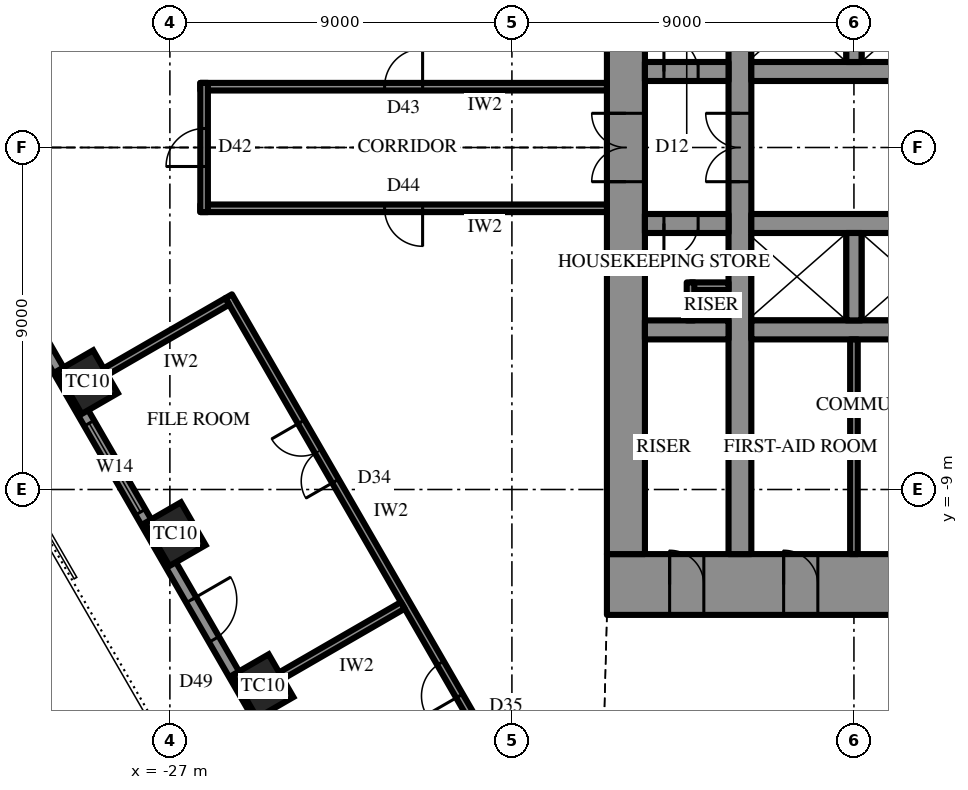
"""IFC4 building model, lengths in metres.
Left out: names, types, materials, properties, quantities, classifications, styles, units other than length and angle.
Written with IfcOpenShell. Run it as: python <this file> out.ifc"""

import sys

from ifc_helpers import new_model, si_unit, direction, frame, frame_2d, origin, origin_2d, place, context, subcontext, project, spatial, rectangle, extrude, element, fill, save


model = new_model("IFC4")
c1 = context("Model", 3, precision=1e-05, world=origin(), true_north=direction((0.0, 1.0)))
c2 = subcontext(c1, "Body", "Model", "MODEL_VIEW")
j1 = project(units=[si_unit("LENGTHUNIT", "METRE"), si_unit("PLANEANGLEUNIT", "RADIAN")], contexts=[c1])
p1 = place(None, origin())
s1 = spatial("IfcSite", under=j1, at=p1, CompositionType="ELEMENT")
p2 = place(p1, origin())
s2 = spatial("IfcBuilding", under=s1, at=p2, CompositionType="ELEMENT")
p3 = place(p2, frame((0.0, 0.0, 249.1)))
s3 = spatial("IfcBuildingStorey", under=s2, at=p3, CompositionType="ELEMENT", Elevation=249.1)
for number, where, z_axis, x_axis in (
    (1, (-29.171, -6.175, 0.0), (0.0, 0.0, 1.0), (0.5, -0.866, 0.0)),
    (2, (-26.861, -10.175, 0.0), (0.0, 0.0, 1.0), (0.5, -0.866, 0.0)),
    (3, (-24.552, -14.175, 0.0), (0.0, 0.0, 1.0), (0.5, -0.866, 0.0)),
):
    element("IfcColumn", number, at=place(p3, frame(where, z_axis=z_axis, x_axis=x_axis)), inside=s3, PredefinedType="COLUMN", context=c2, shape_type="SweptSolid", body=[
        extrude(rectangle(XDim=1.3, YDim=1.1, at=origin_2d()), origin(), (0.0, 0.0, 1.0), 4.2),
    ])
p4 = place(p3, frame((15.5, -11.5, 0.0), z_axis=(0.0, 0.0, 1.0), x_axis=(-1.0, 0.0, 0.0)))
e4 = element("IfcWall", 4, at=p4, inside=s3, PredefinedType="SHEAR", context=c2, shape_type="SweptSolid", body=[
    extrude(rectangle(XDim=31.0, YDim=1.6, at=frame_2d((15.5, 0.0))), origin(), (0.0, 0.0, 1.0), 4.2),
])
p5 = place(p4, frame((16.35, 0.0, 0.0)))
e5 = element("IfcOpeningElement", 5, at=p5, cuts=e4, PredefinedType="OPENING", context=c2, shape_type="SweptSolid", body=[
    extrude(rectangle(XDim=0.9, YDim=2.2, at=frame_2d((0.45, 1.1))), frame((0.0, 0.81, 0.0), z_axis=(0.0, -1.0, 0.0), x_axis=(1.0, 0.0, 0.0)), (0.0, 0.0, 1.0), 1.62),
])
p6 = place(p4, frame((19.35, 0.0, 0.0)))
e6 = element("IfcOpeningElement", 6, at=p6, cuts=e4, PredefinedType="OPENING", context=c2, shape_type="SweptSolid", body=[
    extrude(rectangle(XDim=0.9, YDim=2.2, at=frame_2d((0.45, 1.1))), frame((0.0, 0.81, 0.0), z_axis=(0.0, -1.0, 0.0), x_axis=(1.0, 0.0, 0.0)), (0.0, 0.0, 1.0), 1.62),
])
p7 = place(p4, frame((22.4, 0.0, 0.0)))
e7 = element("IfcOpeningElement", 7, at=p7, cuts=e4, PredefinedType="OPENING", context=c2, shape_type="SweptSolid", body=[
    extrude(rectangle(XDim=1.0, YDim=2.2, at=frame_2d((0.5, 1.1))), frame((0.0, 0.81, 0.0), z_axis=(0.0, -1.0, 0.0), x_axis=(1.0, 0.0, 0.0)), (0.0, 0.0, 1.0), 1.62),
])
p8 = place(p4, frame((1.65, 0.0, 0.0)))
e8 = element("IfcOpeningElement", 8, at=p8, cuts=e4, PredefinedType="OPENING", context=c2, shape_type="SweptSolid", body=[
    extrude(rectangle(XDim=0.9, YDim=2.2, at=frame_2d((0.45, 1.1))), frame((0.0, 0.81, 0.0), z_axis=(0.0, -1.0, 0.0), x_axis=(1.0, 0.0, 0.0)), (0.0, 0.0, 1.0), 1.62),
])
p9 = place(p4, frame((4.65, 0.0, 0.0)))
e9 = element("IfcOpeningElement", 9, at=p9, cuts=e4, PredefinedType="OPENING", context=c2, shape_type="SweptSolid", body=[
    extrude(rectangle(XDim=0.9, YDim=2.2, at=frame_2d((0.45, 1.1))), frame((0.0, 0.81, 0.0), z_axis=(0.0, -1.0, 0.0), x_axis=(1.0, 0.0, 0.0)), (0.0, 0.0, 1.0), 1.62),
])
p10 = place(p4, frame((25.45, 0.0, 0.0)))
e10 = element("IfcOpeningElement", 10, at=p10, cuts=e4, PredefinedType="OPENING", context=c2, shape_type="SweptSolid", body=[
    extrude(rectangle(XDim=0.9, YDim=2.2, at=frame_2d((0.45, 1.1))), frame((0.0, 0.81, 0.0), z_axis=(0.0, -1.0, 0.0), x_axis=(1.0, 0.0, 0.0)), (0.0, 0.0, 1.0), 1.62),
])
p11 = place(p4, frame((28.45, 0.0, 0.0)))
e11 = element("IfcOpeningElement", 11, at=p11, cuts=e4, PredefinedType="OPENING", context=c2, shape_type="SweptSolid", body=[
    extrude(rectangle(XDim=0.9, YDim=2.2, at=frame_2d((0.45, 1.1))), frame((0.0, 0.81, 0.0), z_axis=(0.0, -1.0, 0.0), x_axis=(1.0, 0.0, 0.0)), (0.0, 0.0, 1.0), 1.62),
])
p12 = place(p3, frame((-15.0, 10.7, 0.0), z_axis=(0.0, 0.0, 1.0), x_axis=(0.0, -1.0, 0.0)))
e12 = element("IfcWall", 12, at=p12, inside=s3, PredefinedType="SHEAR", context=c2, shape_type="SweptSolid", body=[
    extrude(rectangle(XDim=21.4, YDim=1.0, at=frame_2d((10.7, 0.0))), origin(), (0.0, 0.0, 1.0), 4.2),
])
p13 = place(p12, frame((9.8, 0.0, 0.0)))
e13 = element("IfcOpeningElement", 13, at=p13, cuts=e12, PredefinedType="OPENING", context=c2, shape_type="SweptSolid", body=[
    extrude(rectangle(XDim=1.8, YDim=2.4, at=frame_2d((0.9, 1.2))), frame((0.0, 0.51, 0.0), z_axis=(0.0, -1.0, 0.0), x_axis=(1.0, 0.0, 0.0)), (0.0, 0.0, 1.0), 1.02),
])
p14 = place(p3, frame((-12.0, -10.7, 0.0), z_axis=(0.0, 0.0, 1.0), x_axis=(0.0, 1.0, 0.0)))
e14 = element("IfcWall", 14, at=p14, inside=s3, PredefinedType="SHEAR", context=c2, shape_type="SweptSolid", body=[
    extrude(rectangle(XDim=21.4, YDim=0.6, at=frame_2d((10.7, 0.0))), origin(), (0.0, 0.0, 1.0), 4.2),
])
p15 = place(p14, frame((9.8, 0.0, 0.0)))
e15 = element("IfcOpeningElement", 15, at=p15, cuts=e14, PredefinedType="OPENING", context=c2, shape_type="SweptSolid", body=[
    extrude(rectangle(XDim=1.8, YDim=2.4, at=frame_2d((0.9, 1.2))), frame((0.0, 0.31, 0.0), z_axis=(0.0, -1.0, 0.0), x_axis=(1.0, 0.0, 0.0)), (0.0, 0.0, 1.0), 0.62),
])
p16 = place(p3, frame((-14.5, 2.0, 0.0), z_axis=(0.0, 0.0, 1.0), x_axis=(1.0, 0.0, 0.0)))
e16 = element("IfcWall", 16, at=p16, inside=s3, PredefinedType="SHEAR", context=c2, shape_type="SweptSolid", body=[
    extrude(rectangle(XDim=2.2, YDim=0.5, at=frame_2d((1.1, 0.0))), origin(), (0.0, 0.0, 1.0), 4.2),
])
p17 = place(p16, frame((0.5, 0.0, 0.0)))
e17 = element("IfcOpeningElement", 17, at=p17, cuts=e16, PredefinedType="OPENING", context=c2, shape_type="SweptSolid", body=[
    extrude(rectangle(XDim=0.9, YDim=2.2, at=frame_2d((0.45, 1.1))), frame((0.0, 0.26, 0.0), z_axis=(0.0, -1.0, 0.0), x_axis=(1.0, 0.0, 0.0)), (0.0, 0.0, 1.0), 0.52),
])
p18 = place(p3, frame((-11.7, 2.0, 0.0), z_axis=(0.0, 0.0, 1.0), x_axis=(1.0, 0.0, 0.0)))
e18 = element("IfcWall", 18, at=p18, inside=s3, PredefinedType="SHEAR", context=c2, shape_type="SweptSolid", body=[
    extrude(rectangle(XDim=5.9, YDim=0.5, at=frame_2d((2.95, 0.0))), origin(), (0.0, 0.0, 1.0), 4.2),
])
p19 = place(p3, frame((-9.0, 2.25, 0.0), z_axis=(0.0, 0.0, 1.0), x_axis=(0.0, 1.0, 0.0)))
e19 = element("IfcWall", 19, at=p19, inside=s3, PredefinedType="SHEAR", context=c2, shape_type="SweptSolid", body=[
    extrude(rectangle(XDim=2.3, YDim=0.4, at=frame_2d((1.15, 0.0))), origin(), (0.0, 0.0, 1.0), 4.2),
])
p20 = place(p3, frame((3.2, -2.0, 0.0), z_axis=(0.0, 0.0, 1.0), x_axis=(-1.0, 0.0, 0.0)))
e20 = element("IfcWall", 20, at=p20, inside=s3, PredefinedType="SHEAR", context=c2, shape_type="SweptSolid", body=[
    extrude(rectangle(XDim=14.9, YDim=0.5, at=frame_2d((7.45, 0.0))), origin(), (0.0, 0.0, 1.0), 4.2),
])
p21 = place(p20, frame((1.15, 0.0, 0.0)))
e21 = element("IfcOpeningElement", 21, at=p21, cuts=e20, PredefinedType="OPENING", context=c2, shape_type="SweptSolid", body=[
    extrude(rectangle(XDim=1.1, YDim=2.2, at=frame_2d((0.55, 1.1))), frame((0.0, 0.26, 0.0), z_axis=(0.0, -1.0, 0.0), x_axis=(1.0, 0.0, 0.0)), (0.0, 0.0, 1.0), 0.52),
])
p22 = place(p20, frame((4.15, 0.0, 0.0)))
e22 = element("IfcOpeningElement", 22, at=p22, cuts=e20, PredefinedType="OPENING", context=c2, shape_type="SweptSolid", body=[
    extrude(rectangle(XDim=1.1, YDim=2.2, at=frame_2d((0.55, 1.1))), frame((0.0, 0.26, 0.0), z_axis=(0.0, -1.0, 0.0), x_axis=(1.0, 0.0, 0.0)), (0.0, 0.0, 1.0), 0.52),
])
p23 = place(p20, frame((7.15, 0.0, 0.0)))
e23 = element("IfcOpeningElement", 23, at=p23, cuts=e20, PredefinedType="OPENING", context=c2, shape_type="SweptSolid", body=[
    extrude(rectangle(XDim=1.1, YDim=2.2, at=frame_2d((0.55, 1.1))), frame((0.0, 0.26, 0.0), z_axis=(0.0, -1.0, 0.0), x_axis=(1.0, 0.0, 0.0)), (0.0, 0.0, 1.0), 0.52),
])
p24 = place(p20, frame((10.15, 0.0, 0.0)))
e24 = element("IfcOpeningElement", 24, at=p24, cuts=e20, PredefinedType="OPENING", context=c2, shape_type="SweptSolid", body=[
    extrude(rectangle(XDim=1.1, YDim=2.2, at=frame_2d((0.55, 1.1))), frame((0.0, 0.26, 0.0), z_axis=(0.0, -1.0, 0.0), x_axis=(1.0, 0.0, 0.0)), (0.0, 0.0, 1.0), 0.52),
])
p25 = place(p3, frame((-12.3, -2.0, 0.0), z_axis=(0.0, 0.0, 1.0), x_axis=(-1.0, 0.0, 0.0)))
e25 = element("IfcWall", 25, at=p25, inside=s3, PredefinedType="SHEAR", context=c2, shape_type="SweptSolid", body=[
    extrude(rectangle(XDim=2.2, YDim=0.5, at=frame_2d((1.1, 0.0))), origin(), (0.0, 0.0, 1.0), 4.2),
])
p26 = place(p25, frame((0.8, 0.0, 0.0)))
e26 = element("IfcOpeningElement", 26, at=p26, cuts=e25, PredefinedType="OPENING", context=c2, shape_type="SweptSolid", body=[
    extrude(rectangle(XDim=0.9, YDim=2.2, at=frame_2d((0.45, 1.1))), frame((0.0, 0.26, 0.0), z_axis=(0.0, -1.0, 0.0), x_axis=(1.0, 0.0, 0.0)), (0.0, 0.0, 1.0), 0.52),
])
p27 = place(p3, frame((11.7, -4.8, 0.0), z_axis=(0.0, 0.0, 1.0), x_axis=(-1.0, 0.0, 0.0)))
e27 = element("IfcWall", 27, at=p27, inside=s3, PredefinedType="SHEAR", context=c2, shape_type="SweptSolid", body=[
    extrude(rectangle(XDim=23.4, YDim=0.5, at=frame_2d((11.7, 0.0))), origin(), (0.0, 0.0, 1.0), 4.2),
])
p28 = place(p27, frame((6.6, 0.0, 0.0)))
e28 = element("IfcOpeningElement", 28, at=p28, cuts=e27, PredefinedType="OPENING", context=c2, shape_type="SweptSolid", body=[
    extrude(rectangle(XDim=1.2, YDim=2.2, at=frame_2d((0.6, 1.1))), frame((0.0, 0.26, 0.0), z_axis=(0.0, -1.0, 0.0), x_axis=(1.0, 0.0, 0.0)), (0.0, 0.0, 1.0), 0.52),
])
p29 = place(p27, frame((3.6, 0.0, 0.0)))
e29 = element("IfcOpeningElement", 29, at=p29, cuts=e27, PredefinedType="OPENING", context=c2, shape_type="SweptSolid", body=[
    extrude(rectangle(XDim=1.2, YDim=2.2, at=frame_2d((0.6, 1.1))), frame((0.0, 0.26, 0.0), z_axis=(0.0, -1.0, 0.0), x_axis=(1.0, 0.0, 0.0)), (0.0, 0.0, 1.0), 0.52),
])
p30 = place(p3, frame((-12.3, -4.8, 0.0), z_axis=(0.0, 0.0, 1.0), x_axis=(-1.0, 0.0, 0.0)))
e30 = element("IfcWall", 30, at=p30, inside=s3, PredefinedType="SHEAR", context=c2, shape_type="SweptSolid", body=[
    extrude(rectangle(XDim=2.2, YDim=0.5, at=frame_2d((1.1, 0.0))), origin(), (0.0, 0.0, 1.0), 4.2),
])
p31 = place(p3, frame((-9.0, -2.25, 0.0), z_axis=(0.0, 0.0, 1.0), x_axis=(0.0, -1.0, 0.0)))
e31 = element("IfcWall", 31, at=p31, inside=s3, PredefinedType="SHEAR", context=c2, shape_type="SweptSolid", body=[
    extrude(rectangle(XDim=2.3, YDim=0.4, at=frame_2d((1.15, 0.0))), origin(), (0.0, 0.0, 1.0), 4.2),
])
p32 = place(p3, frame((-31.263, -3.551, 0.0), z_axis=(0.0, 0.0, 1.0), x_axis=(0.500000442367, -0.866025148383, 0.0)))
e32 = element("IfcWall", 32, at=p32, inside=s3, PredefinedType="SOLIDWALL", context=c2, shape_type="SweptSolid", body=[
    extrude(rectangle(XDim=25.113, YDim=0.3, at=frame_2d((12.556, 0.0))), origin(), (0.0, 0.0, 1.0), 2.8),
])
p33 = place(p32, frame((4.278, 0.0, 0.6)))
e33 = element("IfcOpeningElement", 33, at=p33, cuts=e32, PredefinedType="OPENING", context=c2, shape_type="SweptSolid", body=[
    extrude(rectangle(XDim=2.7, YDim=1.95, at=frame_2d((1.35, 0.975))), frame((0.0, 0.16, 0.0), z_axis=(0.0, -1.0, 0.0), x_axis=(1.0, 0.0, 0.0)), (0.0, 0.0, 1.0), 0.32),
])
p34 = place(p32, frame((9.647, 0.0, 0.0)))
e34 = element("IfcOpeningElement", 34, at=p34, cuts=e32, PredefinedType="OPENING", context=c2, shape_type="SweptSolid", body=[
    extrude(rectangle(XDim=1.2, YDim=2.4, at=frame_2d((0.6, 1.2))), frame((0.0, 0.16, 0.0), z_axis=(0.0, -1.0, 0.0), x_axis=(1.0, 0.0, 0.0)), (0.0, 0.0, 1.0), 0.32),
])
p35 = place(p32, frame((13.516, 0.0, 0.6)))
e35 = element("IfcOpeningElement", 35, at=p35, cuts=e32, PredefinedType="OPENING", context=c2, shape_type="SweptSolid", body=[
    extrude(rectangle(XDim=2.7, YDim=1.95, at=frame_2d((1.35, 0.975))), frame((0.0, 0.16, 0.0), z_axis=(0.0, -1.0, 0.0), x_axis=(1.0, 0.0, 0.0)), (0.0, 0.0, 1.0), 0.32),
])
p36 = place(p32, frame((18.135, 0.0, 0.6)))
e36 = element("IfcOpeningElement", 36, at=p36, cuts=e32, PredefinedType="OPENING", context=c2, shape_type="SweptSolid", body=[
    extrude(rectangle(XDim=2.7, YDim=1.95, at=frame_2d((1.35, 0.975))), frame((0.0, 0.16, 0.0), z_axis=(0.0, -1.0, 0.0), x_axis=(1.0, 0.0, 0.0)), (0.0, 0.0, 1.0), 0.32),
])
p37 = place(p3, frame((-9.0, -5.05, 0.0), z_axis=(0.0, 0.0, 1.0), x_axis=(0.0, -1.0, 0.0)))
e37 = element("IfcWall", 37, at=p37, inside=s3, PredefinedType="PARTITIONING", context=c2, shape_type="SweptSolid", body=[
    extrude(rectangle(XDim=5.65, YDim=0.2, at=frame_2d((2.825, 0.0))), origin(), (0.0, 0.0, 1.0), 4.0),
])
for number, where, z_axis, x_axis in (
    (38, (-12.3, -3.65, 0.0), (0.0, 0.0, 1.0), (-1.0, 0.0, 0.0)),
    (39, (-13.3, -3.55, 0.0), (0.0, 0.0, 1.0), (0.0, -1.0, 0.0)),
):
    element("IfcWall", number, at=place(p3, frame(where, z_axis=z_axis, x_axis=x_axis)), inside=s3, PredefinedType="PARTITIONING", context=c2, shape_type="SweptSolid", body=[
        extrude(rectangle(XDim=1.0, YDim=0.2, at=frame_2d((0.5, 0.0))), origin(), (0.0, 0.0, 1.0), 4.0),
    ])
p38 = place(p3, frame((-25.453, -3.913, 0.0), z_axis=(0.0, 0.0, 1.0), x_axis=(0.499989069193, -0.866031714597, 0.0)))
e40 = element("IfcWall", 40, at=p38, inside=s3, PredefinedType="PARTITIONING", context=c2, shape_type="SweptSolid", body=[
    extrude(rectangle(XDim=14.056, YDim=0.2, at=frame_2d((7.028, 0.0))), origin(), (0.0, 0.0, 1.0), 4.0),
])
p39 = place(p38, frame((3.819, 0.0, 0.0)))
e41 = element("IfcOpeningElement", 41, at=p39, cuts=e40, PredefinedType="OPENING", context=c2, shape_type="SweptSolid", body=[
    extrude(rectangle(XDim=1.8, YDim=2.4, at=frame_2d((0.9, 1.2))), frame((0.0, 0.11, 0.0), z_axis=(0.0, -1.0, 0.0), x_axis=(1.0, 0.0, 0.0)), (0.0, 0.0, 1.0), 0.22),
])
p40 = place(p38, frame((11.147, 0.0, 0.0)))
e42 = element("IfcOpeningElement", 42, at=p40, cuts=e40, PredefinedType="OPENING", context=c2, shape_type="SweptSolid", body=[
    extrude(rectangle(XDim=1.0, YDim=2.2, at=frame_2d((0.5, 1.1))), frame((0.0, 0.11, 0.0), z_axis=(0.0, -1.0, 0.0), x_axis=(1.0, 0.0, 0.0)), (0.0, 0.0, 1.0), 0.22),
])
for number, where, z_axis, x_axis in (
    (43, (-25.49, -4.05, 0.0), (0.0, 0.0, 1.0), (-0.866, -0.5, 0.0)),
    (44, (-20.871, -12.05, 0.0), (0.0, 0.0, 1.0), (-0.866, -0.5, 0.0)),
):
    element("IfcWall", number, at=place(p3, frame(where, z_axis=z_axis, x_axis=x_axis)), inside=s3, PredefinedType="PARTITIONING", context=c2, shape_type="SweptSolid", body=[
        extrude(rectangle(XDim=3.7, YDim=0.2, at=frame_2d((1.85, 0.0))), origin(), (0.0, 0.0, 1.0), 3.082),
    ])
p41 = place(p3, frame((-15.5, 1.6, 0.0), z_axis=(0.0, 0.0, 1.0), x_axis=(-1.0, 0.0, 0.0)))
e45 = element("IfcWall", 45, at=p41, inside=s3, PredefinedType="PARTITIONING", context=c2, shape_type="SweptSolid", body=[
    extrude(rectangle(XDim=10.7, YDim=0.2, at=frame_2d((5.35, 0.0))), origin(), (0.0, 0.0, 1.0), 4.0),
])
p42 = place(p41, frame((4.85, 0.0, 0.0)))
e46 = element("IfcOpeningElement", 46, at=p42, cuts=e45, PredefinedType="OPENING", context=c2, shape_type="SweptSolid", body=[
    extrude(rectangle(XDim=1.0, YDim=2.2, at=frame_2d((0.5, 1.1))), frame((0.0, 0.11, 0.0), z_axis=(0.0, -1.0, 0.0), x_axis=(1.0, 0.0, 0.0)), (0.0, 0.0, 1.0), 0.22),
])
p43 = place(p3, frame((-15.5, -1.6, 0.0), z_axis=(0.0, 0.0, 1.0), x_axis=(-1.0, 0.0, 0.0)))
e47 = element("IfcWall", 47, at=p43, inside=s3, PredefinedType="PARTITIONING", context=c2, shape_type="SweptSolid", body=[
    extrude(rectangle(XDim=10.7, YDim=0.2, at=frame_2d((5.35, 0.0))), origin(), (0.0, 0.0, 1.0), 4.0),
])
p44 = place(p43, frame((4.85, 0.0, 0.0)))
e48 = element("IfcOpeningElement", 48, at=p44, cuts=e47, PredefinedType="OPENING", context=c2, shape_type="SweptSolid", body=[
    extrude(rectangle(XDim=1.0, YDim=2.2, at=frame_2d((0.5, 1.1))), frame((0.0, 0.11, 0.0), z_axis=(0.0, -1.0, 0.0), x_axis=(1.0, 0.0, 0.0)), (0.0, 0.0, 1.0), 0.22),
])
p45 = place(p3, frame((-26.1, -1.7, 0.0), z_axis=(0.0, 0.0, 1.0), x_axis=(0.0, 1.0, 0.0)))
e49 = element("IfcWall", 49, at=p45, inside=s3, PredefinedType="PARTITIONING", context=c2, shape_type="SweptSolid", body=[
    extrude(rectangle(XDim=3.4, YDim=0.2, at=frame_2d((1.7, 0.0))), origin(), (0.0, 0.0, 1.0), 4.0),
])
p46 = place(p45, frame((1.2, 0.0, 0.0)))
e50 = element("IfcOpeningElement", 50, at=p46, cuts=e49, PredefinedType="OPENING", context=c2, shape_type="SweptSolid", body=[
    extrude(rectangle(XDim=1.0, YDim=2.2, at=frame_2d((0.5, 1.1))), frame((0.0, 0.11, 0.0), z_axis=(0.0, -1.0, 0.0), x_axis=(1.0, 0.0, 0.0)), (0.0, 0.0, 1.0), 0.22),
])
p47 = place(p33, origin())
e51 = element("IfcWindow", 51, at=p47, inside=s3, PartitioningType="SINGLE_PANEL", PredefinedType="WINDOW", context=c2, shape_type="SweptSolid", body=[
    extrude(rectangle(XDim=2.7, YDim=1.95, at=frame_2d((1.35, 0.975))), frame((0.0, 0.03, 0.0), z_axis=(0.0, -1.0, 0.0), x_axis=(1.0, 0.0, 0.0)), (0.0, 0.0, 1.0), 0.06),
])
fill(e33, e51)
p48 = place(p34, origin())
e52 = element("IfcDoor", 52, at=p48, inside=s3, OperationType="SINGLE_SWING_RIGHT", PredefinedType="DOOR", context=c2, shape_type="SweptSolid", body=[
    extrude(rectangle(XDim=1.2, YDim=2.4, at=frame_2d((0.6, 1.2))), frame((0.0, 0.025, 0.0), z_axis=(0.0, -1.0, 0.0), x_axis=(1.0, 0.0, 0.0)), (0.0, 0.0, 1.0), 0.05),
])
fill(e34, e52)
p49 = place(p13, frame((1.8, 0.0, 0.0), z_axis=(0.0, 0.0, 1.0), x_axis=(-1.0, 0.0, 0.0)))
e53 = element("IfcDoor", 53, at=p49, inside=s3, OperationType="DOUBLE_DOOR_SINGLE_SWING", PredefinedType="DOOR", context=c2, shape_type="SweptSolid", body=[
    extrude(rectangle(XDim=1.8, YDim=2.4, at=frame_2d((0.9, 1.2))), frame((0.0, 0.025, 0.0), z_axis=(0.0, -1.0, 0.0), x_axis=(1.0, 0.0, 0.0)), (0.0, 0.0, 1.0), 0.05),
])
fill(e13, e53)
p50 = place(p10, frame((0.9, 0.0, 0.0), z_axis=(0.0, 0.0, 1.0), x_axis=(-1.0, 0.0, 0.0)))
e54 = element("IfcDoor", 54, at=p50, inside=s3, OperationType="SINGLE_SWING_RIGHT", PredefinedType="DOOR", context=c2, shape_type="SweptSolid", body=[
    extrude(rectangle(XDim=0.9, YDim=2.2, at=frame_2d((0.45, 1.1))), frame((0.0, 0.025, 0.0), z_axis=(0.0, -1.0, 0.0), x_axis=(1.0, 0.0, 0.0)), (0.0, 0.0, 1.0), 0.05),
])
fill(e10, e54)
p51 = place(p11, frame((0.9, 0.0, 0.0), z_axis=(0.0, 0.0, 1.0), x_axis=(-1.0, 0.0, 0.0)))
e55 = element("IfcDoor", 55, at=p51, inside=s3, OperationType="SINGLE_SWING_RIGHT", PredefinedType="DOOR", context=c2, shape_type="SweptSolid", body=[
    extrude(rectangle(XDim=0.9, YDim=2.2, at=frame_2d((0.45, 1.1))), frame((0.0, 0.025, 0.0), z_axis=(0.0, -1.0, 0.0), x_axis=(1.0, 0.0, 0.0)), (0.0, 0.0, 1.0), 0.05),
])
fill(e11, e55)
p52 = place(p17, origin())
e56 = element("IfcDoor", 56, at=p52, inside=s3, OperationType="SINGLE_SWING_RIGHT", PredefinedType="DOOR", context=c2, shape_type="SweptSolid", body=[
    extrude(rectangle(XDim=0.9, YDim=2.2, at=frame_2d((0.45, 1.1))), frame((0.0, 0.025, 0.0), z_axis=(0.0, -1.0, 0.0), x_axis=(1.0, 0.0, 0.0)), (0.0, 0.0, 1.0), 0.05),
])
fill(e17, e56)
p53 = place(p26, origin())
e57 = element("IfcDoor", 57, at=p53, inside=s3, OperationType="SINGLE_SWING_LEFT", PredefinedType="DOOR", context=c2, shape_type="SweptSolid", body=[
    extrude(rectangle(XDim=0.9, YDim=2.2, at=frame_2d((0.45, 1.1))), frame((0.0, 0.025, 0.0), z_axis=(0.0, -1.0, 0.0), x_axis=(1.0, 0.0, 0.0)), (0.0, 0.0, 1.0), 0.05),
])
fill(e26, e57)
p54 = place(p15, origin())
e58 = element("IfcDoor", 58, at=p54, inside=s3, OperationType="DOUBLE_DOOR_SINGLE_SWING", PredefinedType="DOOR", context=c2, shape_type="SweptSolid", body=[
    extrude(rectangle(XDim=1.8, YDim=2.4, at=frame_2d((0.9, 1.2))), frame((0.0, 0.025, 0.0), z_axis=(0.0, -1.0, 0.0), x_axis=(1.0, 0.0, 0.0)), (0.0, 0.0, 1.0), 0.05),
])
fill(e15, e58)
p55 = place(p39, frame((1.8, 0.0, 0.0), z_axis=(0.0, 0.0, 1.0), x_axis=(-1.0, 0.0, 0.0)))
e59 = element("IfcDoor", 59, at=p55, inside=s3, OperationType="DOUBLE_DOOR_SINGLE_SWING", PredefinedType="DOOR", context=c2, shape_type="SweptSolid", body=[
    extrude(rectangle(XDim=1.8, YDim=2.4, at=frame_2d((0.9, 1.2))), frame((0.0, 0.025, 0.0), z_axis=(0.0, -1.0, 0.0), x_axis=(1.0, 0.0, 0.0)), (0.0, 0.0, 1.0), 0.05),
])
fill(e41, e59)
p56 = place(p40, frame((1.0, 0.0, 0.0), z_axis=(0.0, 0.0, 1.0), x_axis=(-1.0, 0.0, 0.0)))
e60 = element("IfcDoor", 60, at=p56, inside=s3, OperationType="SINGLE_SWING_RIGHT", PredefinedType="DOOR", context=c2, shape_type="SweptSolid", body=[
    extrude(rectangle(XDim=1.0, YDim=2.2, at=frame_2d((0.5, 1.1))), frame((0.0, 0.025, 0.0), z_axis=(0.0, -1.0, 0.0), x_axis=(1.0, 0.0, 0.0)), (0.0, 0.0, 1.0), 0.05),
])
fill(e42, e60)
p57 = place(p42, frame((1.0, 0.0, 0.0), z_axis=(0.0, 0.0, 1.0), x_axis=(-1.0, 0.0, 0.0)))
e61 = element("IfcDoor", 61, at=p57, inside=s3, OperationType="SINGLE_SWING_LEFT", PredefinedType="DOOR", context=c2, shape_type="SweptSolid", body=[
    extrude(rectangle(XDim=1.0, YDim=2.2, at=frame_2d((0.5, 1.1))), frame((0.0, 0.025, 0.0), z_axis=(0.0, -1.0, 0.0), x_axis=(1.0, 0.0, 0.0)), (0.0, 0.0, 1.0), 0.05),
])
fill(e46, e61)
p58 = place(p44, origin())
e62 = element("IfcDoor", 62, at=p58, inside=s3, OperationType="SINGLE_SWING_RIGHT", PredefinedType="DOOR", context=c2, shape_type="SweptSolid", body=[
    extrude(rectangle(XDim=1.0, YDim=2.2, at=frame_2d((0.5, 1.1))), frame((0.0, 0.025, 0.0), z_axis=(0.0, -1.0, 0.0), x_axis=(1.0, 0.0, 0.0)), (0.0, 0.0, 1.0), 0.05),
])
fill(e48, e62)
p59 = place(p46, origin())
e63 = element("IfcDoor", 63, at=p59, inside=s3, OperationType="SINGLE_SWING_RIGHT", PredefinedType="DOOR", context=c2, shape_type="SweptSolid", body=[
    extrude(rectangle(XDim=1.0, YDim=2.2, at=frame_2d((0.5, 1.1))), frame((0.0, 0.025, 0.0), z_axis=(0.0, -1.0, 0.0), x_axis=(1.0, 0.0, 0.0)), (0.0, 0.0, 1.0), 0.05),
])
fill(e50, e63)
save(model, sys.argv[1])
